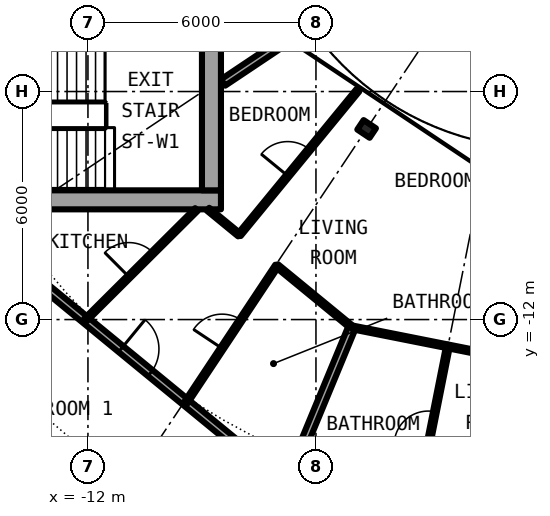
"""IFC4 building model, lengths in metres.
Left out: names, types, materials, properties, quantities, classifications, styles, units other than length and angle.
Written with IfcOpenShell. Run it as: python <this file> out.ifc"""

import sys

from ifc_helpers import new_model, si_unit, direction, frame, frame_2d, origin, origin_2d, place, context, subcontext, project, spatial, rectangle, i_section, extrude, element, fill, save


model = new_model("IFC4")
c1 = context("Model", 3, precision=1e-05, world=origin(), true_north=direction((0.0, 1.0)))
c2 = subcontext(c1, "Body", "Model", "MODEL_VIEW")
j1 = project(units=[si_unit("LENGTHUNIT", "METRE"), si_unit("PLANEANGLEUNIT", "RADIAN")], contexts=[c1])
p1 = place(None, origin())
s1 = spatial("IfcSite", under=j1, at=p1, CompositionType="ELEMENT")
p2 = place(p1, origin())
s2 = spatial("IfcBuilding", under=s1, at=p2, CompositionType="ELEMENT")
p3 = place(p2, frame((0.0, 0.0, 161.6)))
s3 = spatial("IfcBuildingStorey", under=s2, at=p3, CompositionType="ELEMENT", Elevation=161.6)
p4 = place(p3, frame((-4.667, -6.984, 0.0), z_axis=(0.0, 0.0, 1.0), x_axis=(-0.55557023302, -0.831469612303, 0.0)))
e1 = element("IfcColumn", 1, at=p4, inside=s3, PredefinedType="COLUMN", context=c2, shape_type="SweptSolid", body=[
    extrude(i_section(OverallWidth=0.3, OverallDepth=0.39, WebThickness=0.011, FlangeThickness=0.019, FilletRadius=0.027, at=origin_2d()), origin(), (0.0, 0.0, 1.0), 3.05),
])
p5 = place(p3, frame((-22.1, -8.85, 0.0), z_axis=(0.0, 0.0, 1.0), x_axis=(1.0, 0.0, 0.0)))
e2 = element("IfcWall", 2, at=p5, inside=s3, PredefinedType="SHEAR", context=c2, shape_type="SweptSolid", body=[
    extrude(rectangle(XDim=13.6, YDim=0.5, at=frame_2d((6.8, 0.0))), origin(), (0.0, 0.0, 1.0), 3.05),
])
p6 = place(p5, frame((1.025, 0.0, 0.0)))
e3 = element("IfcOpeningElement", 3, at=p6, cuts=e2, PredefinedType="OPENING", context=c2, shape_type="SweptSolid", body=[
    extrude(rectangle(XDim=1.2, YDim=2.3, at=frame_2d((0.6, 1.15))), frame((0.0, 0.26, 0.0), z_axis=(0.0, -1.0, 0.0), x_axis=(1.0, 0.0, 0.0)), (0.0, 0.0, 1.0), 0.52),
])
p7 = place(p3, frame((-8.75, 8.6, 0.0), z_axis=(0.0, 0.0, 1.0), x_axis=(0.0, -1.0, 0.0)))
e4 = element("IfcWall", 4, at=p7, inside=s3, PredefinedType="SHEAR", context=c2, shape_type="SweptSolid", body=[
    extrude(rectangle(XDim=17.2, YDim=0.5, at=frame_2d((8.6, 0.0))), origin(), (0.0, 0.0, 1.0), 3.05),
])
p8 = place(p7, frame((7.4, 0.0, 0.1)))
e5 = element("IfcOpeningElement", 5, at=p8, cuts=e4, PredefinedType="OPENING", context=c2, shape_type="SweptSolid", body=[
    extrude(rectangle(XDim=2.4, YDim=2.2, at=frame_2d((1.2, 1.1))), frame((0.0, 0.26, 0.0), z_axis=(0.0, -1.0, 0.0), x_axis=(1.0, 0.0, 0.0)), (0.0, 0.0, 1.0), 0.52),
])
p9 = place(p3, frame((-18.542, -12.389, 0.0), z_axis=(0.0, 0.0, 1.0), x_axis=(0.740947367223, -0.671563101283, 0.0)))
e6 = element("IfcWall", 6, at=p9, inside=s3, PredefinedType="PARTITIONING", context=c2, shape_type="SweptSolid", body=[
    extrude(rectangle(XDim=10.837, YDim=0.2, at=frame_2d((5.419, 0.0))), origin(), (0.0, 0.0, 1.0), 2.7),
])
p10 = place(p9, frame((6.002, 0.0, 0.0)))
e7 = element("IfcOpeningElement", 7, at=p10, cuts=e6, PredefinedType="OPENING", context=c2, shape_type="SweptSolid", body=[
    extrude(rectangle(XDim=1.0, YDim=2.3, at=frame_2d((0.5, 1.15))), frame((0.0, 0.11, 0.0), z_axis=(0.0, -1.0, 0.0), x_axis=(1.0, 0.0, 0.0)), (0.0, 0.0, 1.0), 0.22),
])
p11 = place(p3, frame((-14.717, -9.834, 0.0), z_axis=(0.0, 0.0, 1.0), x_axis=(0.773034536097, -0.634363938131, 0.0)))
e8 = element("IfcWall", 8, at=p11, inside=s3, PredefinedType="PARTITIONING", context=c2, shape_type="SweptSolid", body=[
    extrude(rectangle(XDim=10.277, YDim=0.2, at=frame_2d((5.138, 0.0))), origin(), (0.0, 0.0, 1.0), 2.7),
])
p12 = place(p11, frame((4.638, 0.0, 0.0)))
e9 = element("IfcOpeningElement", 9, at=p12, cuts=e8, PredefinedType="OPENING", context=c2, shape_type="SweptSolid", body=[
    extrude(rectangle(XDim=1.0, YDim=2.3, at=frame_2d((0.5, 1.15))), frame((0.0, 0.11, 0.0), z_axis=(0.0, -1.0, 0.0), x_axis=(1.0, 0.0, 0.0)), (0.0, 0.0, 1.0), 0.22),
])
p13 = place(p3, frame((-2.527, -12.706, 0.0), z_axis=(0.0, 0.0, 1.0), x_axis=(0.980766092797, -0.195186759846, 0.0)))
e10 = element("IfcWall", 10, at=p13, inside=s3, PredefinedType="PARTITIONING", context=c2, shape_type="SweptSolid", body=[
    extrude(rectangle(XDim=2.577, YDim=0.1, at=frame_2d((1.288, 0.0))), origin(), (0.0, 0.0, 1.0), 2.7),
])
p14 = place(p13, frame((0.838, 0.0, 0.0)))
e11 = element("IfcOpeningElement", 11, at=p14, cuts=e10, PredefinedType="OPENING", context=c2, shape_type="SweptSolid", body=[
    extrude(rectangle(XDim=0.9, YDim=2.3, at=frame_2d((0.45, 1.15))), frame((0.0, 0.06, 0.0), z_axis=(0.0, -1.0, 0.0), x_axis=(1.0, 0.0, 0.0)), (0.0, 0.0, 1.0), 0.12),
])
p15 = place(p3, frame((-8.839, -9.098, 0.0), z_axis=(0.0, 0.0, 1.0), x_axis=(0.7731800648, -0.634186555673, 0.0)))
e12 = element("IfcWall", 12, at=p15, inside=s3, PredefinedType="PARTITIONING", context=c2, shape_type="SweptSolid", body=[
    extrude(rectangle(XDim=1.064, YDim=0.1, at=frame_2d((0.532, 0.0))), origin(), (0.0, 0.0, 1.0), 2.7),
])
p16 = place(p3, frame((-7.031, -10.582, 0.0), z_axis=(0.0, 0.0, 1.0), x_axis=(0.772943675046, -0.634474645046, 0.0)))
e13 = element("IfcWall", 13, at=p16, inside=s3, PredefinedType="PARTITIONING", context=c2, shape_type="SweptSolid", body=[
    extrude(rectangle(XDim=2.557, YDim=0.1, at=frame_2d((1.278, 0.0))), origin(), (0.0, 0.0, 1.0), 2.7),
])
p17 = place(p3, frame((-6.513, -4.472, 0.0), z_axis=(0.0, 0.0, 1.0), x_axis=(-0.83133816625, -0.555766905579, 0.0)))
e14 = element("IfcWall", 14, at=p17, inside=s3, PredefinedType="PARTITIONING", context=c2, shape_type="SweptSolid", body=[
    extrude(rectangle(XDim=2.323, YDim=0.2, at=frame_2d((1.162, 0.0))), origin(), (0.0, 0.0, 1.0), 2.7),
])
p18 = place(p3, frame((-12.065, -12.011, 0.0), z_axis=(0.0, 0.0, 1.0), x_axis=(0.708793214553, 0.705416316088, 0.0)))
e15 = element("IfcWall", 15, at=p18, inside=s3, PredefinedType="PARTITIONING", context=c2, shape_type="SweptSolid", body=[
    extrude(rectangle(XDim=4.121, YDim=0.1, at=frame_2d((2.061, 0.0))), origin(), (0.0, 0.0, 1.0), 2.7),
])
p19 = place(p18, frame((1.611, 0.0, 0.0)))
e16 = element("IfcOpeningElement", 16, at=p19, cuts=e15, PredefinedType="OPENING", context=c2, shape_type="SweptSolid", body=[
    extrude(rectangle(XDim=0.9, YDim=2.3, at=frame_2d((0.45, 1.15))), frame((0.0, 0.06, 0.0), z_axis=(0.0, -1.0, 0.0), x_axis=(1.0, 0.0, 0.0)), (0.0, 0.0, 1.0), 0.12),
])
p20 = place(p3, frame((-9.418, -14.182, 0.0), z_axis=(0.0, 0.0, 1.0), x_axis=(0.553303732327, 0.832979579457, 0.0)))
e17 = element("IfcWall", 17, at=p20, inside=s3, PredefinedType="PARTITIONING", context=c2, shape_type="SweptSolid", body=[
    extrude(rectangle(XDim=4.319, YDim=0.1, at=frame_2d((2.16, 0.0))), origin(), (0.0, 0.0, 1.0), 2.7),
])
p21 = place(p20, frame((1.71, 0.0, 0.0)))
e18 = element("IfcOpeningElement", 18, at=p21, cuts=e17, PredefinedType="OPENING", context=c2, shape_type="SweptSolid", body=[
    extrude(rectangle(XDim=0.9, YDim=2.3, at=frame_2d((0.45, 1.15))), frame((0.0, 0.06, 0.0), z_axis=(0.0, -1.0, 0.0), x_axis=(1.0, 0.0, 0.0)), (0.0, 0.0, 1.0), 0.12),
])
p22 = place(p3, frame((-8.019, -9.771, 0.0), z_axis=(0.0, 0.0, 1.0), x_axis=(0.634401778971, 0.773003481776, 0.0)))
e19 = element("IfcWall", 19, at=p22, inside=s3, PredefinedType="PARTITIONING", context=c2, shape_type="SweptSolid", body=[
    extrude(rectangle(XDim=4.92, YDim=0.1, at=frame_2d((2.46, 0.0))), origin(), (0.0, 0.0, 1.0), 2.7),
])
p23 = place(p22, frame((2.01, 0.0, 0.0)))
e20 = element("IfcOpeningElement", 20, at=p23, cuts=e19, PredefinedType="OPENING", context=c2, shape_type="SweptSolid", body=[
    extrude(rectangle(XDim=0.9, YDim=2.3, at=frame_2d((0.45, 1.15))), frame((0.0, 0.06, 0.0), z_axis=(0.0, -1.0, 0.0), x_axis=(1.0, 0.0, 0.0)), (0.0, 0.0, 1.0), 0.12),
])
p24 = place(p3, frame((-6.77, -16.354, 0.0), z_axis=(0.0, 0.0, 1.0), x_axis=(0.38258387732, 0.923920763277, 0.0)))
e21 = element("IfcWall", 21, at=p24, inside=s3, PredefinedType="PARTITIONING", context=c2, shape_type="SweptSolid", body=[
    extrude(rectangle(XDim=4.49, YDim=0.2, at=frame_2d((2.245, 0.0))), origin(), (0.0, 0.0, 1.0), 2.7),
])
p25 = place(p3, frame((-3.387, -17.026, 0.0), z_axis=(0.0, 0.0, 1.0), x_axis=(0.1952206631, 0.980759344946, 0.0)))
e22 = element("IfcWall", 22, at=p25, inside=s3, PredefinedType="PARTITIONING", context=c2, shape_type="SweptSolid", body=[
    extrude(rectangle(XDim=4.405, YDim=0.1, at=frame_2d((2.202, 0.0))), origin(), (0.0, 0.0, 1.0), 2.7),
])
p26 = place(p25, frame((1.752, 0.0, 0.0)))
e23 = element("IfcOpeningElement", 23, at=p26, cuts=e22, PredefinedType="OPENING", context=c2, shape_type="SweptSolid", body=[
    extrude(rectangle(XDim=0.9, YDim=2.3, at=frame_2d((0.45, 1.15))), frame((0.0, 0.06, 0.0), z_axis=(0.0, -1.0, 0.0), x_axis=(1.0, 0.0, 0.0)), (0.0, 0.0, 1.0), 0.12),
])
p27 = place(p3, frame((-5.035, -12.208, 0.0), z_axis=(0.0, 0.0, 1.0), x_axis=(0.980857356895, -0.194727618547, 0.0)))
e24 = element("IfcWall", 24, at=p27, inside=s3, PredefinedType="PARTITIONING", context=c2, shape_type="SweptSolid", body=[
    extrude(rectangle(XDim=2.536, YDim=0.1, at=frame_2d((1.268, 0.0))), origin(), (0.0, 0.0, 1.0), 2.7),
])
p28 = place(p12, origin())
e25 = element("IfcDoor", 25, at=p28, inside=s3, OperationType="SINGLE_SWING_LEFT", PredefinedType="DOOR", context=c2, shape_type="SweptSolid", body=[
    extrude(rectangle(XDim=1.0, YDim=2.3, at=frame_2d((0.5, 1.15))), frame((0.0, 0.025, 0.0), z_axis=(0.0, -1.0, 0.0), x_axis=(1.0, 0.0, 0.0)), (0.0, 0.0, 1.0), 0.05),
])
fill(e9, e25)
p29 = place(p21, origin())
e26 = element("IfcDoor", 26, at=p29, inside=s3, OperationType="SINGLE_SWING_RIGHT", PredefinedType="DOOR", context=c2, shape_type="SweptSolid", body=[
    extrude(rectangle(XDim=0.9, YDim=2.3, at=frame_2d((0.45, 1.15))), frame((0.0, 0.025, 0.0), z_axis=(0.0, -1.0, 0.0), x_axis=(1.0, 0.0, 0.0)), (0.0, 0.0, 1.0), 0.05),
])
fill(e18, e26)
p30 = place(p19, origin())
e27 = element("IfcDoor", 27, at=p30, inside=s3, OperationType="SINGLE_SWING_LEFT", PredefinedType="DOOR", context=c2, shape_type="SweptSolid", body=[
    extrude(rectangle(XDim=0.9, YDim=2.3, at=frame_2d((0.45, 1.15))), frame((0.0, 0.025, 0.0), z_axis=(0.0, -1.0, 0.0), x_axis=(1.0, 0.0, 0.0)), (0.0, 0.0, 1.0), 0.05),
])
fill(e16, e27)
p31 = place(p23, origin())
e28 = element("IfcDoor", 28, at=p31, inside=s3, OperationType="SINGLE_SWING_LEFT", PredefinedType="DOOR", context=c2, shape_type="SweptSolid", body=[
    extrude(rectangle(XDim=0.9, YDim=2.3, at=frame_2d((0.45, 1.15))), frame((0.0, 0.025, 0.0), z_axis=(0.0, -1.0, 0.0), x_axis=(1.0, 0.0, 0.0)), (0.0, 0.0, 1.0), 0.05),
])
fill(e20, e28)
p32 = place(p26, origin())
e29 = element("IfcDoor", 29, at=p32, inside=s3, OperationType="SINGLE_SWING_LEFT", PredefinedType="DOOR", context=c2, shape_type="SweptSolid", body=[
    extrude(rectangle(XDim=0.9, YDim=2.3, at=frame_2d((0.45, 1.15))), frame((0.0, 0.025, 0.0), z_axis=(0.0, -1.0, 0.0), x_axis=(1.0, 0.0, 0.0)), (0.0, 0.0, 1.0), 0.05),
])
fill(e23, e29)
save(model, sys.argv[1])
